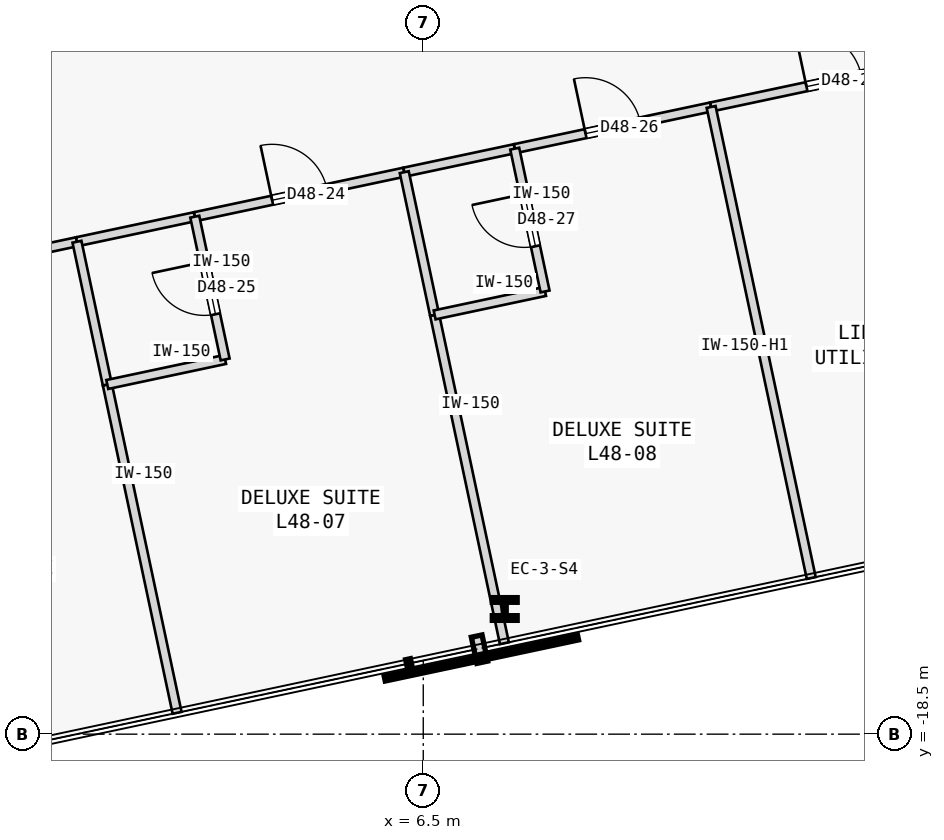
"""IFC4 building model, lengths in metres.
Left out: names, types, materials, properties, quantities, classifications, styles, units other than length and angle.
Written with IfcOpenShell. Run it as: python <this file> out.ifc"""

import sys

from ifc_helpers import new_model, si_unit, direction, frame, frame_2d, origin, origin_2d, place, context, subcontext, project, spatial, rectangle, i_section, extrude, element, fill, save


model = new_model("IFC4")
c1 = context("Model", 3, precision=1e-05, world=origin(), true_north=direction((0.0, 1.0)))
c2 = subcontext(c1, "Body", "Model", "MODEL_VIEW")
j1 = project(units=[si_unit("LENGTHUNIT", "METRE"), si_unit("PLANEANGLEUNIT", "RADIAN")], contexts=[c1])
p1 = place(None, origin())
s1 = spatial("IfcSite", under=j1, at=p1, CompositionType="ELEMENT")
p2 = place(p1, origin())
s2 = spatial("IfcBuilding", under=s1, at=p2, CompositionType="ELEMENT")
p3 = place(p2, frame((0.0, 0.0, 185.4)))
s3 = spatial("IfcBuildingStorey", under=s2, at=p3, CompositionType="ELEMENT", Elevation=185.4)
p4 = place(p3, frame((7.84, -16.441, 0.0), z_axis=(0.0, 0.0, 1.0), x_axis=(1.0, 0.0, 0.0)))
e1 = element("IfcColumn", 1, at=p4, inside=s3, PredefinedType="COLUMN", context=c2, shape_type="SweptSolid", body=[
    extrude(i_section(OverallWidth=0.409, OverallDepth=0.374, WebThickness=0.048, FlangeThickness=0.077, FilletRadius=0.015, at=origin_2d()), origin(), (0.0, 0.0, 1.0), 3.4),
])
p5 = place(p3, frame((-2.641, -11.135, 0.0), z_axis=(0.0, 0.0, 1.0), x_axis=(0.978150924733, 0.207896052016, 0.0)))
e2 = element("IfcWall", 2, at=p5, inside=s3, PredefinedType="PARTITIONING", context=c2, shape_type="SweptSolid", body=[
    extrude(rectangle(XDim=3.523, YDim=0.15, at=frame_2d((1.761, 0.0))), origin(), (0.0, 0.0, 1.0), 3.175),
])
p6 = place(p5, frame((1.302, 0.0, 0.0)))
e3 = element("IfcOpeningElement", 3, at=p6, cuts=e2, PredefinedType="OPENING", context=c2, shape_type="SweptSolid", body=[
    extrude(rectangle(XDim=0.92, YDim=2.15, at=frame_2d((0.46, 1.075))), frame((0.0, 0.085, 0.0), z_axis=(0.0, -1.0, 0.0), x_axis=(1.0, 0.0, 0.0)), (0.0, 0.0, 1.0), 0.17),
])
p7 = place(p3, frame((2.743, -9.99, 0.0), z_axis=(0.0, 0.0, 1.0), x_axis=(0.978153036861, 0.207886114205, 0.0)))
e4 = element("IfcWall", 4, at=p7, inside=s3, PredefinedType="PARTITIONING", context=c2, shape_type="SweptSolid", body=[
    extrude(rectangle(XDim=3.522, YDim=0.15, at=frame_2d((1.761, 0.0))), origin(), (0.0, 0.0, 1.0), 3.175),
])
p8 = place(p7, frame((1.301, 0.0, 0.0)))
e5 = element("IfcOpeningElement", 5, at=p8, cuts=e4, PredefinedType="OPENING", context=c2, shape_type="SweptSolid", body=[
    extrude(rectangle(XDim=0.92, YDim=2.15, at=frame_2d((0.46, 1.075))), frame((0.0, 0.085, 0.0), z_axis=(0.0, -1.0, 0.0), x_axis=(1.0, 0.0, 0.0)), (0.0, 0.0, 1.0), 0.17),
])
p9 = place(p3, frame((0.805, -10.402, 0.0), z_axis=(0.0, 0.0, 1.0), x_axis=(0.978149140323, 0.20790444749, 0.0)))
e6 = element("IfcWall", 6, at=p9, inside=s3, PredefinedType="PARTITIONING", context=c2, shape_type="SweptSolid", body=[
    extrude(rectangle(XDim=1.981, YDim=0.15, at=frame_2d((0.99, 0.0))), origin(), (0.0, 0.0, 1.0), 3.175),
])
p10 = place(p3, frame((8.004, -8.872, 0.0), z_axis=(0.0, 0.0, 1.0), x_axis=(0.97814625873, 0.20791800435, 0.0)))
e7 = element("IfcWall", 7, at=p10, inside=s3, PredefinedType="PARTITIONING", context=c2, shape_type="SweptSolid", body=[
    extrude(rectangle(XDim=3.302, YDim=0.15, at=frame_2d((1.651, 0.0))), origin(), (0.0, 0.0, 1.0), 3.175),
])
p11 = place(p10, frame((1.191, 0.0, 0.0)))
e8 = element("IfcOpeningElement", 8, at=p11, cuts=e7, PredefinedType="OPENING", context=c2, shape_type="SweptSolid", body=[
    extrude(rectangle(XDim=0.92, YDim=2.15, at=frame_2d((0.46, 1.075))), frame((0.0, 0.085, 0.0), z_axis=(0.0, -1.0, 0.0), x_axis=(1.0, 0.0, 0.0)), (0.0, 0.0, 1.0), 0.17),
])
p12 = place(p3, frame((6.188, -9.258, 0.0), z_axis=(0.0, 0.0, 1.0), x_axis=(0.978132112624, 0.207984543303, 0.0)))
e9 = element("IfcWall", 9, at=p12, inside=s3, PredefinedType="PARTITIONING", context=c2, shape_type="SweptSolid", body=[
    extrude(rectangle(XDim=1.857, YDim=0.15, at=frame_2d((0.928, 0.0))), origin(), (0.0, 0.0, 1.0), 3.175),
])
p13 = place(p3, frame((11.234, -8.185, 0.0), z_axis=(0.0, 0.0, 1.0), x_axis=(0.978155092113, 0.207876443525, 0.0)))
e10 = element("IfcWall", 10, at=p13, inside=s3, PredefinedType="PARTITIONING", context=c2, shape_type="SweptSolid", body=[
    extrude(rectangle(XDim=4.127, YDim=0.15, at=frame_2d((2.063, 0.0))), origin(), (0.0, 0.0, 1.0), 3.175),
])
p14 = place(p13, frame((1.604, 0.0, 0.0)))
e11 = element("IfcOpeningElement", 11, at=p14, cuts=e10, PredefinedType="OPENING", context=c2, shape_type="SweptSolid", body=[
    extrude(rectangle(XDim=0.92, YDim=2.15, at=frame_2d((0.46, 1.075))), frame((0.0, 0.085, 0.0), z_axis=(0.0, -1.0, 0.0), x_axis=(1.0, 0.0, 0.0)), (0.0, 0.0, 1.0), 0.17),
])
p15 = place(p3, frame((2.452, -18.149, 0.0), z_axis=(0.0, 0.0, 1.0), x_axis=(-0.20791588359, 0.978146709523, 0.0)))
e12 = element("IfcWall", 12, at=p15, inside=s3, PredefinedType="PARTITIONING", context=c2, shape_type="SweptSolid", body=[
    extrude(rectangle(XDim=5.52, YDim=0.15, at=frame_2d((2.76, 0.0))), origin(), (0.0, 0.0, 1.0), 3.175),
])
p16 = place(p3, frame((1.304, -12.75, 0.0), z_axis=(0.0, 0.0, 1.0), x_axis=(-0.207917150959, 0.978146440129, 0.0)))
e13 = element("IfcWall", 13, at=p16, inside=s3, PredefinedType="PARTITIONING", context=c2, shape_type="SweptSolid", body=[
    extrude(rectangle(XDim=2.4, YDim=0.15, at=frame_2d((1.2, 0.0))), origin(), (0.0, 0.0, 1.0), 3.175),
])
p17 = place(p3, frame((1.304, -12.75, 0.0), z_axis=(0.0, 0.0, 1.0), x_axis=(0.978149140323, 0.20790444749, 0.0)))
e14 = element("IfcWall", 14, at=p17, inside=s3, PredefinedType="PARTITIONING", context=c2, shape_type="SweptSolid", body=[
    extrude(rectangle(XDim=1.981, YDim=0.15, at=frame_2d((0.99, 0.0))), origin(), (0.0, 0.0, 1.0), 3.175),
])
p18 = place(p3, frame((3.242, -12.338, 0.0), z_axis=(0.0, 0.0, 1.0), x_axis=(-0.207917150959, 0.978146440129, 0.0)))
e15 = element("IfcWall", 15, at=p18, inside=s3, PredefinedType="PARTITIONING", context=c2, shape_type="SweptSolid", body=[
    extrude(rectangle(XDim=2.4, YDim=0.15, at=frame_2d((1.2, 0.0))), origin(), (0.0, 0.0, 1.0), 3.175),
])
p19 = place(p18, frame((0.76, 0.0, 0.0)))
e16 = element("IfcOpeningElement", 16, at=p19, cuts=e15, PredefinedType="OPENING", context=c2, shape_type="SweptSolid", body=[
    extrude(rectangle(XDim=0.88, YDim=2.15, at=frame_2d((0.44, 1.075))), frame((0.0, 0.085, 0.0), z_axis=(0.0, -1.0, 0.0), x_axis=(1.0, 0.0, 0.0)), (0.0, 0.0, 1.0), 0.17),
])
p20 = place(p3, frame((7.834, -17.005, 0.0), z_axis=(0.0, 0.0, 1.0), x_axis=(-0.207882560392, 0.978153792144, 0.0)))
e17 = element("IfcWall", 17, at=p20, inside=s3, PredefinedType="PARTITIONING", context=c2, shape_type="SweptSolid", body=[
    extrude(rectangle(XDim=5.52, YDim=0.15, at=frame_2d((2.76, 0.0))), origin(), (0.0, 0.0, 1.0), 3.175),
])
p21 = place(p3, frame((6.687, -11.606, 0.0), z_axis=(0.0, 0.0, 1.0), x_axis=(-0.207917150959, 0.978146440129, 0.0)))
e18 = element("IfcWall", 18, at=p21, inside=s3, PredefinedType="PARTITIONING", context=c2, shape_type="SweptSolid", body=[
    extrude(rectangle(XDim=2.4, YDim=0.15, at=frame_2d((1.2, 0.0))), origin(), (0.0, 0.0, 1.0), 3.175),
])
p22 = place(p3, frame((6.687, -11.606, 0.0), z_axis=(0.0, 0.0, 1.0), x_axis=(0.978132112624, 0.207984543303, 0.0)))
e19 = element("IfcWall", 19, at=p22, inside=s3, PredefinedType="PARTITIONING", context=c2, shape_type="SweptSolid", body=[
    extrude(rectangle(XDim=1.857, YDim=0.15, at=frame_2d((0.928, 0.0))), origin(), (0.0, 0.0, 1.0), 3.175),
])
p23 = place(p3, frame((8.503, -11.219, 0.0), z_axis=(0.0, 0.0, 1.0), x_axis=(-0.207917150959, 0.978146440129, 0.0)))
e20 = element("IfcWall", 20, at=p23, inside=s3, PredefinedType="PARTITIONING", context=c2, shape_type="SweptSolid", body=[
    extrude(rectangle(XDim=2.4, YDim=0.15, at=frame_2d((1.2, 0.0))), origin(), (0.0, 0.0, 1.0), 3.175),
])
p24 = place(p23, frame((0.76, 0.0, 0.0)))
e21 = element("IfcOpeningElement", 21, at=p24, cuts=e20, PredefinedType="OPENING", context=c2, shape_type="SweptSolid", body=[
    extrude(rectangle(XDim=0.88, YDim=2.15, at=frame_2d((0.44, 1.075))), frame((0.0, 0.085, 0.0), z_axis=(0.0, -1.0, 0.0), x_axis=(1.0, 0.0, 0.0)), (0.0, 0.0, 1.0), 0.17),
])
p25 = place(p3, frame((12.881, -15.932, 0.0), z_axis=(0.0, 0.0, 1.0), x_axis=(-0.207916267651, 0.978146627887, 0.0)))
e22 = element("IfcWall", 22, at=p25, inside=s3, PredefinedType="PARTITIONING", context=c2, shape_type="SweptSolid", body=[
    extrude(rectangle(XDim=7.92, YDim=0.15, at=frame_2d((3.96, 0.0))), origin(), (0.0, 0.0, 1.0), 2.725),
])
p26 = place(p8, origin())
e23 = element("IfcDoor", 23, at=p26, inside=s3, OperationType="SINGLE_SWING_LEFT", PredefinedType="DOOR", context=c2, shape_type="SweptSolid", body=[
    extrude(rectangle(XDim=0.92, YDim=2.15, at=frame_2d((0.46, 1.075))), frame((0.0, 0.025, 0.0), z_axis=(0.0, -1.0, 0.0), x_axis=(1.0, 0.0, 0.0)), (0.0, 0.0, 1.0), 0.05),
])
fill(e5, e23)
p27 = place(p19, origin())
e24 = element("IfcDoor", 24, at=p27, inside=s3, OperationType="SINGLE_SWING_RIGHT", PredefinedType="DOOR", context=c2, shape_type="SweptSolid", body=[
    extrude(rectangle(XDim=0.88, YDim=2.15, at=frame_2d((0.44, 1.075))), frame((0.0, 0.025, 0.0), z_axis=(0.0, -1.0, 0.0), x_axis=(1.0, 0.0, 0.0)), (0.0, 0.0, 1.0), 0.05),
])
fill(e16, e24)
p28 = place(p11, origin())
e25 = element("IfcDoor", 25, at=p28, inside=s3, OperationType="SINGLE_SWING_LEFT", PredefinedType="DOOR", context=c2, shape_type="SweptSolid", body=[
    extrude(rectangle(XDim=0.92, YDim=2.15, at=frame_2d((0.46, 1.075))), frame((0.0, 0.025, 0.0), z_axis=(0.0, -1.0, 0.0), x_axis=(1.0, 0.0, 0.0)), (0.0, 0.0, 1.0), 0.05),
])
fill(e8, e25)
p29 = place(p24, origin())
e26 = element("IfcDoor", 26, at=p29, inside=s3, OperationType="SINGLE_SWING_RIGHT", PredefinedType="DOOR", context=c2, shape_type="SweptSolid", body=[
    extrude(rectangle(XDim=0.88, YDim=2.15, at=frame_2d((0.44, 1.075))), frame((0.0, 0.025, 0.0), z_axis=(0.0, -1.0, 0.0), x_axis=(1.0, 0.0, 0.0)), (0.0, 0.0, 1.0), 0.05),
])
fill(e21, e26)
p30 = place(p14, origin())
e27 = element("IfcDoor", 27, at=p30, inside=s3, OperationType="SINGLE_SWING_LEFT", PredefinedType="DOOR", context=c2, shape_type="SweptSolid", body=[
    extrude(rectangle(XDim=0.92, YDim=2.15, at=frame_2d((0.46, 1.075))), frame((0.0, 0.025, 0.0), z_axis=(0.0, -1.0, 0.0), x_axis=(1.0, 0.0, 0.0)), (0.0, 0.0, 1.0), 0.05),
])
fill(e11, e27)
save(model, sys.argv[1])
